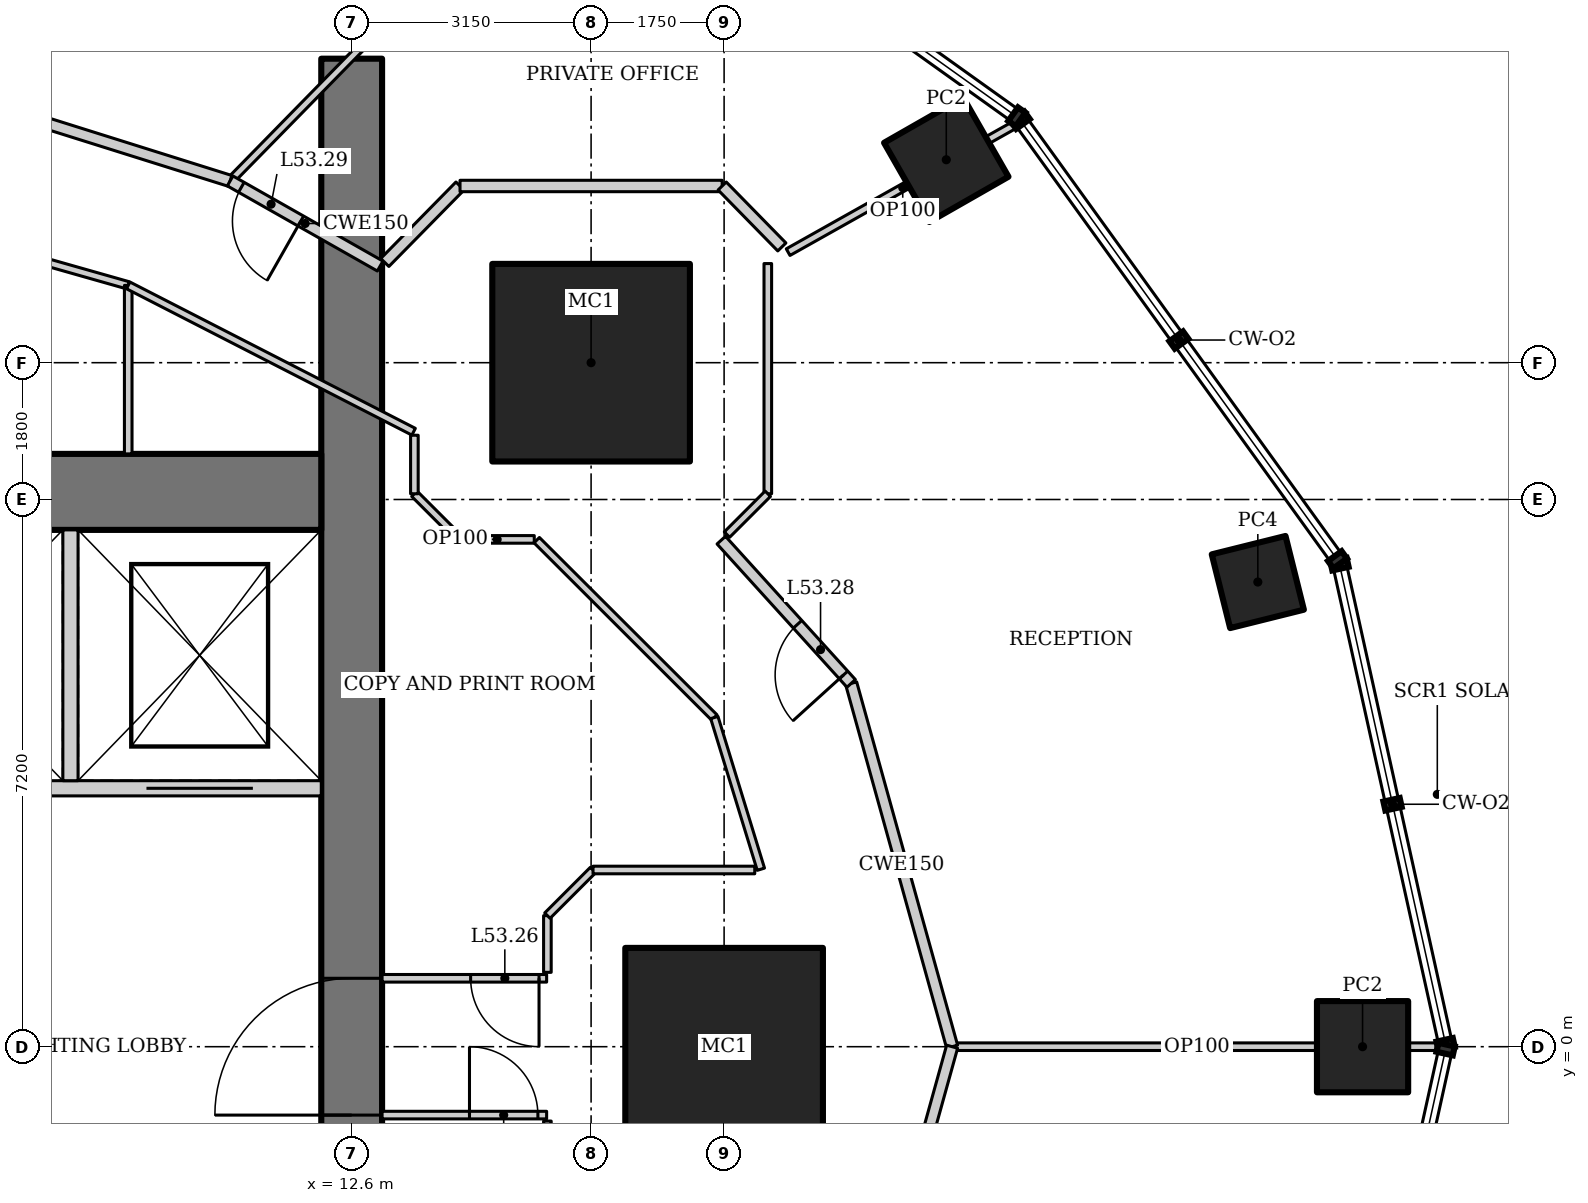
"""IFC4 building model, lengths in metres.
Left out: names, types, materials, properties, quantities, classifications, styles, units other than length and angle.
Written with IfcOpenShell. Run it as: python <this file> out.ifc"""

import sys

from ifc_helpers import new_model, si_unit, direction, frame, frame_2d, origin, origin_2d, place, context, subcontext, project, spatial, rectangle, hollow_rectangle, extrude, element, fill, save


model = new_model("IFC4")
c1 = context("Model", 3, precision=1e-05, world=origin(), true_north=direction((0.0, 1.0)))
c2 = subcontext(c1, "Body", "Model", "MODEL_VIEW")
j1 = project(units=[si_unit("LENGTHUNIT", "METRE"), si_unit("PLANEANGLEUNIT", "RADIAN")], contexts=[c1])
p1 = place(None, origin())
s1 = spatial("IfcSite", under=j1, at=p1, CompositionType="ELEMENT")
p2 = place(p1, origin())
s2 = spatial("IfcBuilding", under=s1, at=p2, CompositionType="ELEMENT")
p3 = place(p2, frame((0.0, 0.0, 228.4)))
s3 = spatial("IfcBuildingStorey", under=s2, at=p3, CompositionType="ELEMENT", Elevation=228.4)
for number, where, z_axis, x_axis in (
    (1, (17.5, 0.0, 0.0), (0.0, 0.0, 1.0), (1.0, 0.0, 0.0)),
    (2, (15.75, 9.0, 0.0), (0.0, 0.0, 1.0), (1.0, 0.0, 0.0)),
):
    element("IfcColumn", number, at=place(p3, frame(where, z_axis=z_axis, x_axis=x_axis)), inside=s3, PredefinedType="COLUMN", context=c2, shape_type="SweptSolid", body=[
        extrude(hollow_rectangle(XDim=2.6, YDim=2.6, WallThickness=0.13, at=origin_2d()), origin(), (0.0, 0.0, 1.0), 4.2),
    ])
p4 = place(p3, frame((25.9, 0.0, 0.0), z_axis=(0.0, 0.0, 1.0), x_axis=(1.0, 0.0, 0.0)))
e3 = element("IfcColumn", 3, at=p4, inside=s3, PredefinedType="COLUMN", context=c2, shape_type="SweptSolid", body=[
    extrude(hollow_rectangle(XDim=1.2, YDim=1.2, WallThickness=0.1, at=origin_2d()), origin(), (0.0, 0.0, 1.0), 4.2),
])
p5 = place(p3, frame((24.522, 6.114, 0.0), z_axis=(0.0, 0.0, 1.0), x_axis=(0.970295726276, 0.2419218956, 0.0)))
e4 = element("IfcColumn", 4, at=p5, inside=s3, PredefinedType="COLUMN", context=c2, shape_type="SweptSolid", body=[
    extrude(hollow_rectangle(XDim=1.0, YDim=1.0, WallThickness=0.08, at=origin_2d()), origin(), (0.0, 0.0, 1.0), 4.2),
])
p6 = place(p3, frame((20.423, 11.67, 0.0), z_axis=(0.0, 0.0, 1.0), x_axis=(0.86824298017, 0.496139221777, 0.0)))
e5 = element("IfcColumn", 5, at=p6, inside=s3, PredefinedType="COLUMN", context=c2, shape_type="SweptSolid", body=[
    extrude(hollow_rectangle(XDim=1.2, YDim=1.2, WallThickness=0.1, at=origin_2d()), origin(), (0.0, 0.0, 1.0), 4.2),
])
p7 = place(p3, frame((12.6, -13.0, 0.0), z_axis=(0.0, 0.0, 1.0), x_axis=(0.0, 1.0, 0.0)))
e6 = element("IfcWall", 6, at=p7, inside=s3, PredefinedType="SHEAR", context=c2, shape_type="SweptSolid", body=[
    extrude(rectangle(XDim=26.0, YDim=0.8, at=frame_2d((13.0, 0.0))), origin(), (0.0, 0.0, 1.0), 4.2),
])
p8 = place(p7, frame((12.1, 0.0, 0.0)))
e7 = element("IfcOpeningElement", 7, at=p8, cuts=e6, PredefinedType="OPENING", context=c2, shape_type="SweptSolid", body=[
    extrude(rectangle(XDim=1.8, YDim=2.1, at=frame_2d((0.9, 1.05))), frame((0.0, 0.41, 0.0), z_axis=(0.0, -1.0, 0.0), x_axis=(1.0, 0.0, 0.0)), (0.0, 0.0, 1.0), 0.82),
])
p9 = place(p3, frame((12.2, 7.3, 0.0), z_axis=(0.0, 0.0, 1.0), x_axis=(-1.0, 0.0, 0.0)))
e8 = element("IfcWall", 8, at=p9, inside=s3, PredefinedType="SHEAR", context=c2, shape_type="SweptSolid", body=[
    extrude(rectangle(XDim=6.6, YDim=1.0, at=frame_2d((3.3, 0.0))), origin(), (0.0, 0.0, 1.0), 4.2),
])
p10 = place(p3, frame((12.2, 3.4, 0.0), z_axis=(0.0, 0.0, 1.0), x_axis=(-1.0, 0.0, 0.0)))
e9 = element("IfcWall", 9, at=p10, inside=s3, PredefinedType="SOLIDWALL", context=c2, shape_type="SweptSolid", body=[
    extrude(rectangle(XDim=6.6, YDim=0.2, at=frame_2d((3.3, 0.0))), origin(), (0.0, 0.0, 1.0), 4.2),
])
p11 = place(p10, frame((4.45, 0.0, 0.0)))
e10 = element("IfcOpeningElement", 10, at=p11, cuts=e9, PredefinedType="OPENING", context=c2, shape_type="SweptSolid", body=[
    extrude(rectangle(XDim=1.1, YDim=2.2, at=frame_2d((0.55, 1.1))), frame((0.0, 0.11, 0.0), z_axis=(0.0, -1.0, 0.0), x_axis=(1.0, 0.0, 0.0)), (0.0, 0.0, 1.0), 0.22),
])
p12 = place(p10, frame((0.9, 0.0, 0.0)))
e11 = element("IfcOpeningElement", 11, at=p12, cuts=e9, PredefinedType="OPENING", context=c2, shape_type="SweptSolid", body=[
    extrude(rectangle(XDim=1.4, YDim=2.2, at=frame_2d((0.7, 1.1))), frame((0.0, 0.11, 0.0), z_axis=(0.0, -1.0, 0.0), x_axis=(1.0, 0.0, 0.0)), (0.0, 0.0, 1.0), 0.22),
])
p13 = place(p3, frame((8.9, 3.5, 0.0), z_axis=(0.0, 0.0, 1.0), x_axis=(0.0, 1.0, 0.0)))
e12 = element("IfcWall", 12, at=p13, inside=s3, PredefinedType="SOLIDWALL", context=c2, shape_type="SweptSolid", body=[
    extrude(rectangle(XDim=3.3, YDim=0.2, at=frame_2d((1.65, 0.0))), origin(), (0.0, 0.0, 1.0), 4.2),
])
p14 = place(p3, frame((26.944, 0.0, 0.0), z_axis=(0.0, 0.0, 1.0), x_axis=(-1.0, 0.0, 0.0)))
e13 = element("IfcWall", 13, at=p14, inside=s3, PredefinedType="PARTITIONING", context=c2, shape_type="SweptSolid", body=[
    extrude(rectangle(XDim=6.444, YDim=0.1, at=frame_2d((3.222, 0.0))), origin(), (0.0, 0.0, 1.0), 3.349),
])
p15 = place(p3, frame((15.709, 16.199, 0.0), z_axis=(0.0, 0.0, 1.0), x_axis=(-0.699758297028, -0.71437967898, 0.0)))
e14 = element("IfcWall", 14, at=p15, inside=s3, PredefinedType="PARTITIONING", context=c2, shape_type="SweptSolid", body=[
    extrude(rectangle(XDim=6.729, YDim=0.1, at=frame_2d((3.365, 0.0))), origin(), (0.0, 0.0, 1.0), 3.41),
])
p16 = place(p3, frame((9.54, 18.65, 0.0), z_axis=(0.0, 0.0, 1.0), x_axis=(-0.458420942987, -0.888735190611, 0.0)))
e15 = element("IfcWall", 15, at=p16, inside=s3, PredefinedType="PARTITIONING", context=c2, shape_type="SweptSolid", body=[
    extrude(rectangle(XDim=6.584, YDim=0.1, at=frame_2d((3.292, 0.0))), origin(), (0.0, 0.0, 1.0), 3.108),
])
p17 = place(p3, frame((20.5, 0.0, 0.0), z_axis=(0.0, 0.0, 1.0), x_axis=(-0.26770731566, 0.963500281859, 0.0)))
e16 = element("IfcWall", 16, at=p17, inside=s3, PredefinedType="PARTITIONING", context=c2, shape_type="SweptSolid", body=[
    extrude(rectangle(XDim=4.961, YDim=0.15, at=frame_2d((2.48, 0.0))), origin(), (0.0, 0.0, 1.0), 4.05),
])
p18 = place(p3, frame((11.001, 11.392, 0.0), z_axis=(0.0, 0.0, 1.0), x_axis=(-0.954031103669, 0.299707612903, 0.0)))
e17 = element("IfcWall", 17, at=p18, inside=s3, PredefinedType="PARTITIONING", context=c2, shape_type="SweptSolid", body=[
    extrude(rectangle(XDim=4.695, YDim=0.15, at=frame_2d((2.348, 0.0))), origin(), (0.0, 0.0, 1.0), 4.05),
])
p19 = place(p18, frame((3.645, 0.0, 0.0)))
e18 = element("IfcOpeningElement", 18, at=p19, cuts=e17, PredefinedType="OPENING", context=c2, shape_type="SweptSolid", body=[
    extrude(rectangle(XDim=0.9, YDim=2.1, at=frame_2d((0.45, 1.05))), frame((0.0, 0.085, 0.0), z_axis=(0.0, -1.0, 0.0), x_axis=(1.0, 0.0, 0.0)), (0.0, 0.0, 1.0), 0.17),
])
p20 = place(p3, frame((19.172, -4.78, 0.0), z_axis=(0.0, 0.0, 1.0), x_axis=(0.26770731566, 0.963500281859, 0.0)))
e19 = element("IfcWall", 19, at=p20, inside=s3, PredefinedType="PARTITIONING", context=c2, shape_type="SweptSolid", body=[
    extrude(rectangle(XDim=4.961, YDim=0.15, at=frame_2d((2.48, 0.0))), origin(), (0.0, 0.0, 1.0), 4.05),
])
p21 = place(p20, frame((0.15, 0.0, 0.0)))
e20 = element("IfcOpeningElement", 20, at=p21, cuts=e19, PredefinedType="OPENING", context=c2, shape_type="SweptSolid", body=[
    extrude(rectangle(XDim=0.9, YDim=2.1, at=frame_2d((0.45, 1.05))), frame((0.0, 0.085, 0.0), z_axis=(0.0, -1.0, 0.0), x_axis=(1.0, 0.0, 0.0)), (0.0, 0.0, 1.0), 0.17),
])
p22 = place(p3, frame((5.68, 11.147, 0.0), z_axis=(0.0, 0.0, 1.0), x_axis=(0.961970251804, -0.27315423234, 0.0)))
e21 = element("IfcWall", 21, at=p22, inside=s3, PredefinedType="PARTITIONING", context=c2, shape_type="SweptSolid", body=[
    extrude(rectangle(XDim=4.137, YDim=0.1, at=frame_2d((2.069, 0.0))), origin(), (0.0, 0.0, 1.0), 4.05),
])
p23 = place(p3, frame((9.66, 10.017, 0.0), z_axis=(0.0, 0.0, 1.0), x_axis=(0.0, -1.0, 0.0)))
e22 = element("IfcWall", 22, at=p23, inside=s3, PredefinedType="PARTITIONING", context=c2, shape_type="SweptSolid", body=[
    extrude(rectangle(XDim=2.217, YDim=0.1, at=frame_2d((1.108, 0.0))), origin(), (0.0, 0.0, 1.0), 4.05),
])
p24 = place(p3, frame((21.358, 12.15, 0.0), z_axis=(0.0, 0.0, 1.0), x_axis=(-0.871730019583, -0.489986502832, 0.0)))
e23 = element("IfcWall", 23, at=p24, inside=s3, PredefinedType="PARTITIONING", context=c2, shape_type="SweptSolid", body=[
    extrude(rectangle(XDim=3.46, YDim=0.1, at=frame_2d((1.73, 0.0))), origin(), (0.0, 0.0, 1.0), 3.524),
])
p25 = place(p3, frame((19.172, 4.78, 0.0), z_axis=(0.0, 0.0, 1.0), x_axis=(-0.671721890643, 0.74080341632, 0.0)))
e24 = element("IfcWall", 24, at=p25, inside=s3, PredefinedType="PARTITIONING", context=c2, shape_type="SweptSolid", body=[
    extrude(rectangle(XDim=2.544, YDim=0.15, at=frame_2d((1.272, 0.0))), origin(), (0.0, 0.0, 1.0), 4.05),
])
p26 = place(p25, frame((0.15, 0.0, 0.0)))
e25 = element("IfcOpeningElement", 25, at=p26, cuts=e24, PredefinedType="OPENING", context=c2, shape_type="SweptSolid", body=[
    extrude(rectangle(XDim=0.9, YDim=2.1, at=frame_2d((0.45, 1.05))), frame((0.0, 0.085, 0.0), z_axis=(0.0, -1.0, 0.0), x_axis=(1.0, 0.0, 0.0)), (0.0, 0.0, 1.0), 0.17),
])
p27 = place(p3, frame((12.975, 10.271, 0.0), z_axis=(0.0, 0.0, 1.0), x_axis=(-0.869722107117, 0.493541747366, 0.0)))
e26 = element("IfcWall", 26, at=p27, inside=s3, PredefinedType="PARTITIONING", context=c2, shape_type="SweptSolid", body=[
    extrude(rectangle(XDim=2.27, YDim=0.15, at=frame_2d((1.135, 0.0))), origin(), (0.0, 0.0, 1.0), 4.05),
])
p28 = place(p27, frame((1.2, 0.0, 0.0)))
e27 = element("IfcOpeningElement", 27, at=p28, cuts=e26, PredefinedType="OPENING", context=c2, shape_type="SweptSolid", body=[
    extrude(rectangle(XDim=0.9, YDim=2.1, at=frame_2d((0.45, 1.05))), frame((0.0, 0.085, 0.0), z_axis=(0.0, -1.0, 0.0), x_axis=(1.0, 0.0, 0.0)), (0.0, 0.0, 1.0), 0.17),
])
p29 = place(p3, frame((9.66, 10.017, 0.0), z_axis=(0.0, 0.0, 1.0), x_axis=(0.889833724874, -0.456284935185, 0.0)))
e28 = element("IfcWall", 28, at=p29, inside=s3, PredefinedType="PARTITIONING", context=c2, shape_type="SweptSolid", body=[
    extrude(rectangle(XDim=4.22, YDim=0.1, at=frame_2d((2.11, 0.0))), origin(), (0.0, 0.0, 1.0), 4.05),
])
p30 = place(p3, frame((15.035, 6.665, 0.0), z_axis=(0.0, 0.0, 1.0), x_axis=(0.707587114823, -0.70662612104, 0.0)))
e29 = element("IfcWall", 29, at=p30, inside=s3, PredefinedType="PARTITIONING", context=c2, shape_type="SweptSolid", body=[
    extrude(rectangle(XDim=3.303, YDim=0.1, at=frame_2d((1.651, 0.0))), origin(), (0.0, 0.0, 1.0), 4.05),
])
p31 = place(p3, frame((15.002, 6.675, 0.0), z_axis=(0.0, 0.0, 1.0), x_axis=(-1.0, 0.0, 0.0)))
e30 = element("IfcWall", 30, at=p31, inside=s3, PredefinedType="PARTITIONING", context=c2, shape_type="SweptSolid", body=[
    extrude(rectangle(XDim=0.977, YDim=0.1, at=frame_2d((0.488, 0.0))), origin(), (0.0, 0.0, 1.0), 4.05),
])
p32 = place(p3, frame((14.025, 6.675, 0.0), z_axis=(0.0, 0.0, 1.0), x_axis=(-0.707106781187, 0.707106781187, 0.0)))
e31 = element("IfcWall", 31, at=p32, inside=s3, PredefinedType="PARTITIONING", context=c2, shape_type="SweptSolid", body=[
    extrude(rectangle(XDim=0.849, YDim=0.1, at=frame_2d((0.425, 0.0))), origin(), (0.0, 0.0, 1.0), 4.05),
])
p33 = place(p3, frame((13.425, 7.275, 0.0), z_axis=(0.0, 0.0, 1.0), x_axis=(0.0, 1.0, 0.0)))
e32 = element("IfcWall", 32, at=p33, inside=s3, PredefinedType="PARTITIONING", context=c2, shape_type="SweptSolid", body=[
    extrude(rectangle(XDim=0.77, YDim=0.1, at=frame_2d((0.385, 0.0))), origin(), (0.0, 0.0, 1.0), 4.05),
])
p34 = place(p3, frame((18.075, 10.304, 0.0), z_axis=(0.0, 0.0, 1.0), x_axis=(0.0, -1.0, 0.0)))
e33 = element("IfcWall", 33, at=p34, inside=s3, PredefinedType="PARTITIONING", context=c2, shape_type="SweptSolid", body=[
    extrude(rectangle(XDim=3.029, YDim=0.1, at=frame_2d((1.514, 0.0))), origin(), (0.0, 0.0, 1.0), 3.601),
])
p35 = place(p3, frame((18.075, 7.275, 0.0), z_axis=(0.0, 0.0, 1.0), x_axis=(-0.707106781187, -0.707106781187, 0.0)))
e34 = element("IfcWall", 34, at=p35, inside=s3, PredefinedType="PARTITIONING", context=c2, shape_type="SweptSolid", body=[
    extrude(rectangle(XDim=0.76, YDim=0.1, at=frame_2d((0.38, 0.0))), origin(), (0.0, 0.0, 1.0), 4.05),
])
p36 = place(p3, frame((13.036, 10.319, 0.0), z_axis=(0.0, 0.0, 1.0), x_axis=(0.701113567316, 0.713049623606, 0.0)))
e35 = element("IfcWall", 35, at=p36, inside=s3, PredefinedType="PARTITIONING", context=c2, shape_type="SweptSolid", body=[
    extrude(rectangle(XDim=1.411, YDim=0.15, at=frame_2d((0.706, 0.0))), origin(), (0.0, 0.0, 1.0), 4.05),
])
p37 = place(p3, frame((14.025, 11.325, 0.0), z_axis=(0.0, 0.0, 1.0), x_axis=(1.0, 0.0, 0.0)))
e36 = element("IfcWall", 36, at=p37, inside=s3, PredefinedType="PARTITIONING", context=c2, shape_type="SweptSolid", body=[
    extrude(rectangle(XDim=3.449, YDim=0.15, at=frame_2d((1.725, 0.0))), origin(), (0.0, 0.0, 1.0), 4.05),
])
p38 = place(p3, frame((17.475, 11.325, 0.0), z_axis=(0.0, 0.0, 1.0), x_axis=(0.699453593529, -0.714678018761, 0.0)))
e37 = element("IfcWall", 37, at=p38, inside=s3, PredefinedType="PARTITIONING", context=c2, shape_type="SweptSolid", body=[
    extrude(rectangle(XDim=1.123, YDim=0.15, at=frame_2d((0.561, 0.0))), origin(), (0.0, 0.0, 1.0), 4.05),
])
p39 = place(p3, frame((13.0, -0.9, 0.0), z_axis=(0.0, 0.0, 1.0), x_axis=(1.0, 0.0, 0.0)))
e38 = element("IfcWall", 38, at=p39, inside=s3, PredefinedType="PARTITIONING", context=c2, shape_type="SweptSolid", body=[
    extrude(rectangle(XDim=2.165, YDim=0.1, at=frame_2d((1.083, 0.0))), origin(), (0.0, 0.0, 1.0), 4.05),
])
p40 = place(p39, frame((1.15, 0.0, 0.0)))
e39 = element("IfcOpeningElement", 39, at=p40, cuts=e38, PredefinedType="OPENING", context=c2, shape_type="SweptSolid", body=[
    extrude(rectangle(XDim=0.9, YDim=2.1, at=frame_2d((0.45, 1.05))), frame((0.0, 0.06, 0.0), z_axis=(0.0, -1.0, 0.0), x_axis=(1.0, 0.0, 0.0)), (0.0, 0.0, 1.0), 0.12),
])
p41 = place(p3, frame((17.372, 4.331, 0.0), z_axis=(0.0, 0.0, 1.0), x_axis=(0.293231279211, -0.956041535129, 0.0)))
e40 = element("IfcWall", 40, at=p41, inside=s3, PredefinedType="PARTITIONING", context=c2, shape_type="SweptSolid", body=[
    extrude(rectangle(XDim=2.088, YDim=0.1, at=frame_2d((1.044, 0.0))), origin(), (0.0, 0.0, 1.0), 4.05),
])
p42 = place(p3, frame((15.165, 0.9, 0.0), z_axis=(0.0, 0.0, 1.0), x_axis=(-1.0, 0.0, 0.0)))
e41 = element("IfcWall", 41, at=p42, inside=s3, PredefinedType="PARTITIONING", context=c2, shape_type="SweptSolid", body=[
    extrude(rectangle(XDim=2.165, YDim=0.1, at=frame_2d((1.083, 0.0))), origin(), (0.0, 0.0, 1.0), 4.05),
])
p43 = place(p42, frame((0.1, 0.0, 0.0)))
e42 = element("IfcOpeningElement", 42, at=p43, cuts=e41, PredefinedType="OPENING", context=c2, shape_type="SweptSolid", body=[
    extrude(rectangle(XDim=0.9, YDim=2.1, at=frame_2d((0.45, 1.05))), frame((0.0, 0.06, 0.0), z_axis=(0.0, -1.0, 0.0), x_axis=(1.0, 0.0, 0.0)), (0.0, 0.0, 1.0), 0.12),
])
for number, where, z_axis, x_axis in (
    (43, (15.175, -1.725, 0.0), (0.0, 0.0, 1.0), (0.0, 1.0, 0.0)),
    (44, (15.175, 0.978, 0.0), (0.0, 0.0, 1.0), (0.0, 1.0, 0.0)),
):
    element("IfcWall", number, at=place(p3, frame(where, z_axis=z_axis, x_axis=x_axis)), inside=s3, PredefinedType="PARTITIONING", context=c2, shape_type="SweptSolid", body=[
        extrude(rectangle(XDim=0.746, YDim=0.1, at=frame_2d((0.373, 0.0))), origin(), (0.0, 0.0, 1.0), 4.05),
    ])
p44 = place(p3, frame((15.175, 1.725, 0.0), z_axis=(0.0, 0.0, 1.0), x_axis=(0.707106781187, 0.707106781187, 0.0)))
e45 = element("IfcWall", 45, at=p44, inside=s3, PredefinedType="PARTITIONING", context=c2, shape_type="SweptSolid", body=[
    extrude(rectangle(XDim=0.849, YDim=0.1, at=frame_2d((0.425, 0.0))), origin(), (0.0, 0.0, 1.0), 4.05),
])
p45 = place(p3, frame((15.775, 2.325, 0.0), z_axis=(0.0, 0.0, 1.0), x_axis=(1.0, 0.0, 0.0)))
e46 = element("IfcWall", 46, at=p45, inside=s3, PredefinedType="PARTITIONING", context=c2, shape_type="SweptSolid", body=[
    extrude(rectangle(XDim=2.128, YDim=0.1, at=frame_2d((1.064, 0.0))), origin(), (0.0, 0.0, 1.0), 4.05),
])
p46 = place(p8, origin())
e47 = element("IfcDoor", 47, at=p46, inside=s3, OperationType="DOUBLE_DOOR_DOUBLE_SWING", PredefinedType="DOOR", context=c2, shape_type="SweptSolid", body=[
    extrude(rectangle(XDim=1.8, YDim=2.1, at=frame_2d((0.9, 1.05))), frame((0.0, 0.025, 0.0), z_axis=(0.0, -1.0, 0.0), x_axis=(1.0, 0.0, 0.0)), (0.0, 0.0, 1.0), 0.05),
])
fill(e7, e47)
p47 = place(p12, origin())
e48 = element("IfcDoor", 48, at=p47, inside=s3, OperationType="DOUBLE_DOOR_SLIDING", PredefinedType="DOOR", context=c2, shape_type="SweptSolid", body=[
    extrude(rectangle(XDim=1.4, YDim=2.2, at=frame_2d((0.7, 1.1))), frame((0.0, 0.025, 0.0), z_axis=(0.0, -1.0, 0.0), x_axis=(1.0, 0.0, 0.0)), (0.0, 0.0, 1.0), 0.05),
])
fill(e11, e48)
p48 = place(p40, origin())
e49 = element("IfcDoor", 49, at=p48, inside=s3, OperationType="SINGLE_SWING_LEFT", PredefinedType="DOOR", context=c2, shape_type="SweptSolid", body=[
    extrude(rectangle(XDim=0.9, YDim=2.1, at=frame_2d((0.45, 1.05))), frame((0.0, 0.025, 0.0), z_axis=(0.0, -1.0, 0.0), x_axis=(1.0, 0.0, 0.0)), (0.0, 0.0, 1.0), 0.05),
])
fill(e39, e49)
p49 = place(p43, origin())
e50 = element("IfcDoor", 50, at=p49, inside=s3, OperationType="SINGLE_SWING_LEFT", PredefinedType="DOOR", context=c2, shape_type="SweptSolid", body=[
    extrude(rectangle(XDim=0.9, YDim=2.1, at=frame_2d((0.45, 1.05))), frame((0.0, 0.025, 0.0), z_axis=(0.0, -1.0, 0.0), x_axis=(1.0, 0.0, 0.0)), (0.0, 0.0, 1.0), 0.05),
])
fill(e42, e50)
p50 = place(p26, origin())
e51 = element("IfcDoor", 51, at=p50, inside=s3, OperationType="SINGLE_SWING_LEFT", PredefinedType="DOOR", context=c2, shape_type="SweptSolid", body=[
    extrude(rectangle(XDim=0.9, YDim=2.1, at=frame_2d((0.45, 1.05))), frame((0.0, 0.025, 0.0), z_axis=(0.0, -1.0, 0.0), x_axis=(1.0, 0.0, 0.0)), (0.0, 0.0, 1.0), 0.05),
])
fill(e25, e51)
p51 = place(p28, origin())
e52 = element("IfcDoor", 52, at=p51, inside=s3, OperationType="SINGLE_SWING_LEFT", PredefinedType="DOOR", context=c2, shape_type="SweptSolid", body=[
    extrude(rectangle(XDim=0.9, YDim=2.1, at=frame_2d((0.45, 1.05))), frame((0.0, 0.025, 0.0), z_axis=(0.0, -1.0, 0.0), x_axis=(1.0, 0.0, 0.0)), (0.0, 0.0, 1.0), 0.05),
])
fill(e27, e52)
save(model, sys.argv[1])
